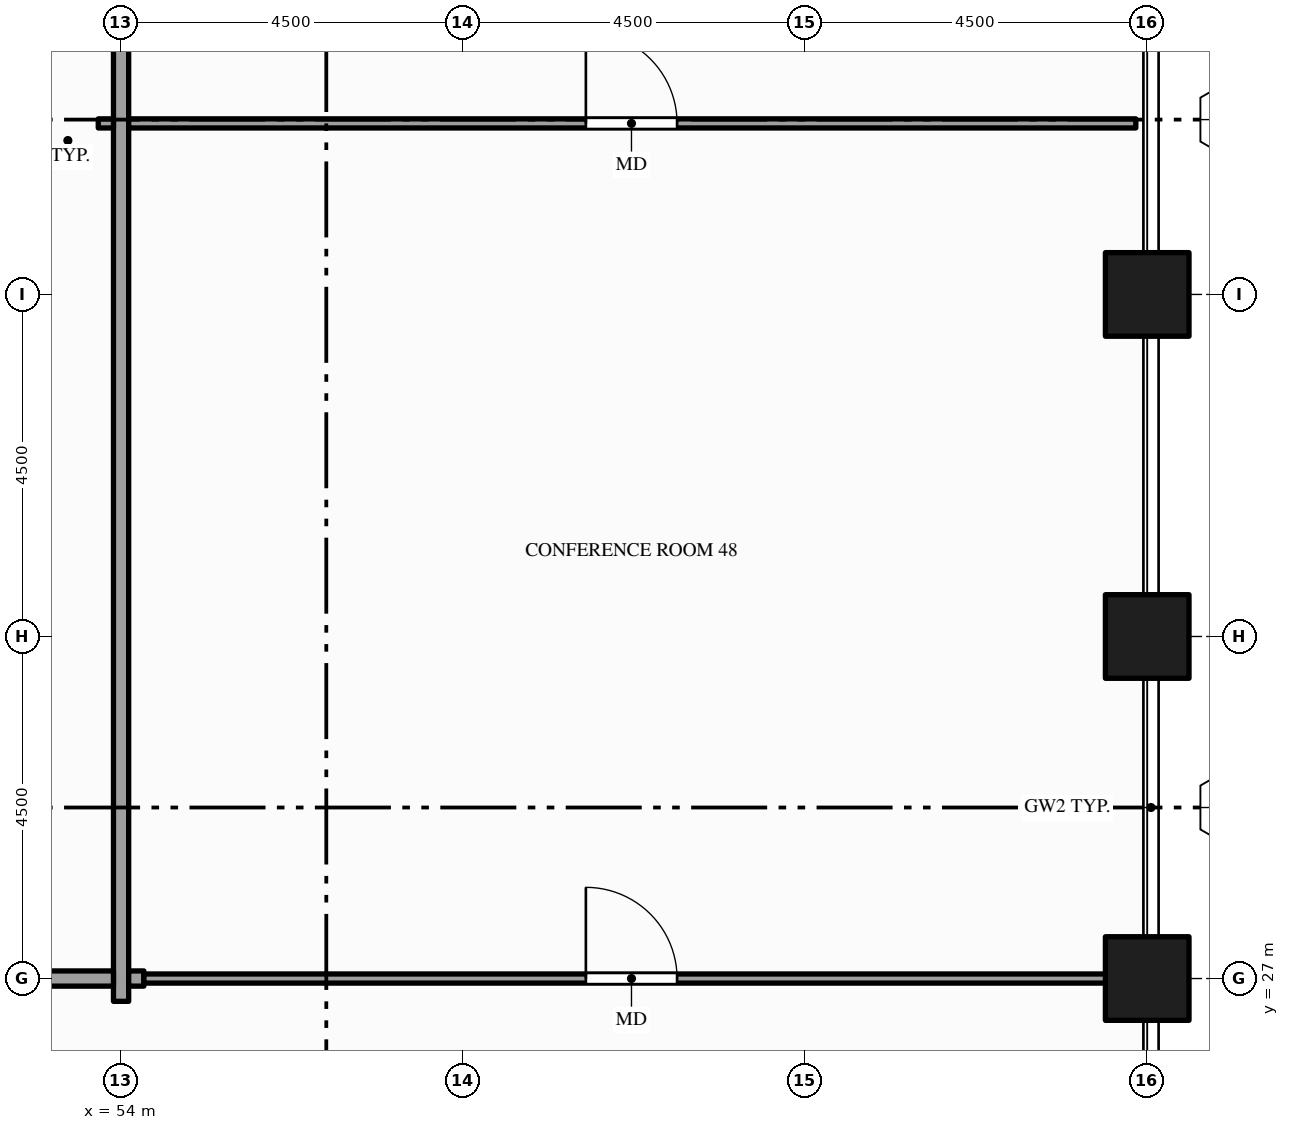
"""IFC4 building model, lengths in metres.
Left out: names, types, materials, properties, quantities, classifications, styles, units other than length and angle.
Written with IfcOpenShell. Run it as: python <this file> out.ifc"""

import sys

from ifc_helpers import new_model, si_unit, direction, frame, frame_2d, origin, origin_2d, place, context, subcontext, project, spatial, rectangle, hollow_rectangle, extrude, element, fill, save


model = new_model("IFC4")
c1 = context("Model", 3, precision=1e-05, world=origin(), true_north=direction((0.0, 1.0)))
c2 = subcontext(c1, "Body", "Model", "MODEL_VIEW")
j1 = project(units=[si_unit("LENGTHUNIT", "METRE"), si_unit("PLANEANGLEUNIT", "RADIAN")], contexts=[c1])
p1 = place(None, origin())
s1 = spatial("IfcSite", under=j1, at=p1, CompositionType="ELEMENT")
p2 = place(p1, origin())
s2 = spatial("IfcBuilding", under=s1, at=p2, CompositionType="ELEMENT")
p3 = place(p2, frame((0.0, 0.0, 14.0)))
s3 = spatial("IfcBuildingStorey", under=s2, at=p3, CompositionType="ELEMENT", Elevation=14.0)
for number, where, z_axis, x_axis in (
    (1, (67.5, 27.0, -0.25), (0.0, 0.0, 1.0), (1.0, 0.0, 0.0)),
    (2, (67.5, 31.5, -0.25), (0.0, 0.0, 1.0), (1.0, 0.0, 0.0)),
    (3, (67.5, 36.0, -0.25), (0.0, 0.0, 1.0), (1.0, 0.0, 0.0)),
):
    element("IfcColumn", number, at=place(p3, frame(where, z_axis=z_axis, x_axis=x_axis)), inside=s3, PredefinedType="COLUMN", context=c2, shape_type="SweptSolid", body=[
        extrude(hollow_rectangle(XDim=1.1, YDim=1.1, WallThickness=0.06, at=origin_2d()), origin(), (0.0, 0.0, 1.0), 5.0),
    ])
p4 = place(p3, frame((54.0, 26.7, 0.0), z_axis=(0.0, 0.0, 1.0), x_axis=(0.0, 1.0, 0.0)))
e4 = element("IfcWall", 4, at=p4, inside=s3, PredefinedType="PARTITIONING", context=c2, shape_type="SweptSolid", body=[
    extrude(rectangle(XDim=22.65, YDim=0.2, at=frame_2d((11.325, 0.0))), origin(), (0.0, 0.0, 1.0), 3.66),
])
p5 = place(p3, frame((27.1, 27.0, 0.0), z_axis=(0.0, 0.0, 1.0), x_axis=(1.0, 0.0, 0.0)))
e5 = element("IfcWall", 5, at=p5, inside=s3, PredefinedType="PARTITIONING", context=c2, shape_type="SweptSolid", body=[
    extrude(rectangle(XDim=26.8, YDim=0.2, at=frame_2d((13.4, 0.0))), origin(), (0.0, 0.0, 1.0), 3.66),
])
p6 = place(p3, frame((54.1, 27.0, 0.0), z_axis=(0.0, 0.0, 1.0), x_axis=(1.0, 0.0, 0.0)))
e6 = element("IfcWall", 6, at=p6, inside=s3, PredefinedType="PARTITIONING", context=c2, shape_type="SweptSolid", body=[
    extrude(rectangle(XDim=0.2, YDim=0.2, at=frame_2d((0.1, 0.0))), origin(), (0.0, 0.0, 1.0), 3.66),
])
p7 = place(p3, frame((54.3, 27.0, 0.0), z_axis=(0.0, 0.0, 1.0), x_axis=(1.0, 0.0, 0.0)))
e7 = element("IfcWall", 7, at=p7, inside=s3, PredefinedType="PARTITIONING", context=c2, shape_type="SweptSolid", body=[
    extrude(rectangle(XDim=13.05, YDim=0.12, at=frame_2d((6.525, 0.0))), origin(), (0.0, 0.0, 1.0), 3.66),
])
p8 = place(p7, frame((5.815, 0.0, 0.0)))
e8 = element("IfcOpeningElement", 8, at=p8, cuts=e7, PredefinedType="OPENING", context=c2, shape_type="SweptSolid", body=[
    extrude(rectangle(XDim=1.2, YDim=2.1, at=frame_2d((0.6, 1.05))), frame((0.0, 0.07, 0.0), z_axis=(0.0, -1.0, 0.0), x_axis=(1.0, 0.0, 0.0)), (0.0, 0.0, 1.0), 0.14),
])
p9 = place(p3, frame((53.7, 38.25, 0.0), z_axis=(0.0, 0.0, 1.0), x_axis=(1.0, 0.0, 0.0)))
e9 = element("IfcWall", 9, at=p9, inside=s3, PredefinedType="PARTITIONING", context=c2, shape_type="SweptSolid", body=[
    extrude(rectangle(XDim=0.2, YDim=0.12, at=frame_2d((0.1, 0.0))), origin(), (0.0, 0.0, 1.0), 3.66),
])
p10 = place(p3, frame((54.1, 38.25, 0.0), z_axis=(0.0, 0.0, 1.0), x_axis=(1.0, 0.0, 0.0)))
e10 = element("IfcWall", 10, at=p10, inside=s3, PredefinedType="PARTITIONING", context=c2, shape_type="SweptSolid", body=[
    extrude(rectangle(XDim=13.25, YDim=0.12, at=frame_2d((6.625, 0.0))), origin(), (0.0, 0.0, 1.0), 3.66),
])
p11 = place(p10, frame((6.015, 0.0, 0.0)))
e11 = element("IfcOpeningElement", 11, at=p11, cuts=e10, PredefinedType="OPENING", context=c2, shape_type="SweptSolid", body=[
    extrude(rectangle(XDim=1.2, YDim=2.1, at=frame_2d((0.6, 1.05))), frame((0.0, 0.07, 0.0), z_axis=(0.0, -1.0, 0.0), x_axis=(1.0, 0.0, 0.0)), (0.0, 0.0, 1.0), 0.14),
])
p12 = place(p8, origin())
e12 = element("IfcDoor", 12, at=p12, inside=s3, OperationType="SINGLE_SWING_LEFT", PredefinedType="DOOR", context=c2, shape_type="SweptSolid", body=[
    extrude(rectangle(XDim=1.2, YDim=2.1, at=frame_2d((0.6, 1.05))), frame((0.0, 0.025, 0.0), z_axis=(0.0, -1.0, 0.0), x_axis=(1.0, 0.0, 0.0)), (0.0, 0.0, 1.0), 0.05),
])
fill(e8, e12)
p13 = place(p11, origin())
e13 = element("IfcDoor", 13, at=p13, inside=s3, OperationType="SINGLE_SWING_LEFT", PredefinedType="DOOR", context=c2, shape_type="SweptSolid", body=[
    extrude(rectangle(XDim=1.2, YDim=2.1, at=frame_2d((0.6, 1.05))), frame((0.0, 0.025, 0.0), z_axis=(0.0, -1.0, 0.0), x_axis=(1.0, 0.0, 0.0)), (0.0, 0.0, 1.0), 0.05),
])
fill(e11, e13)
save(model, sys.argv[1])
